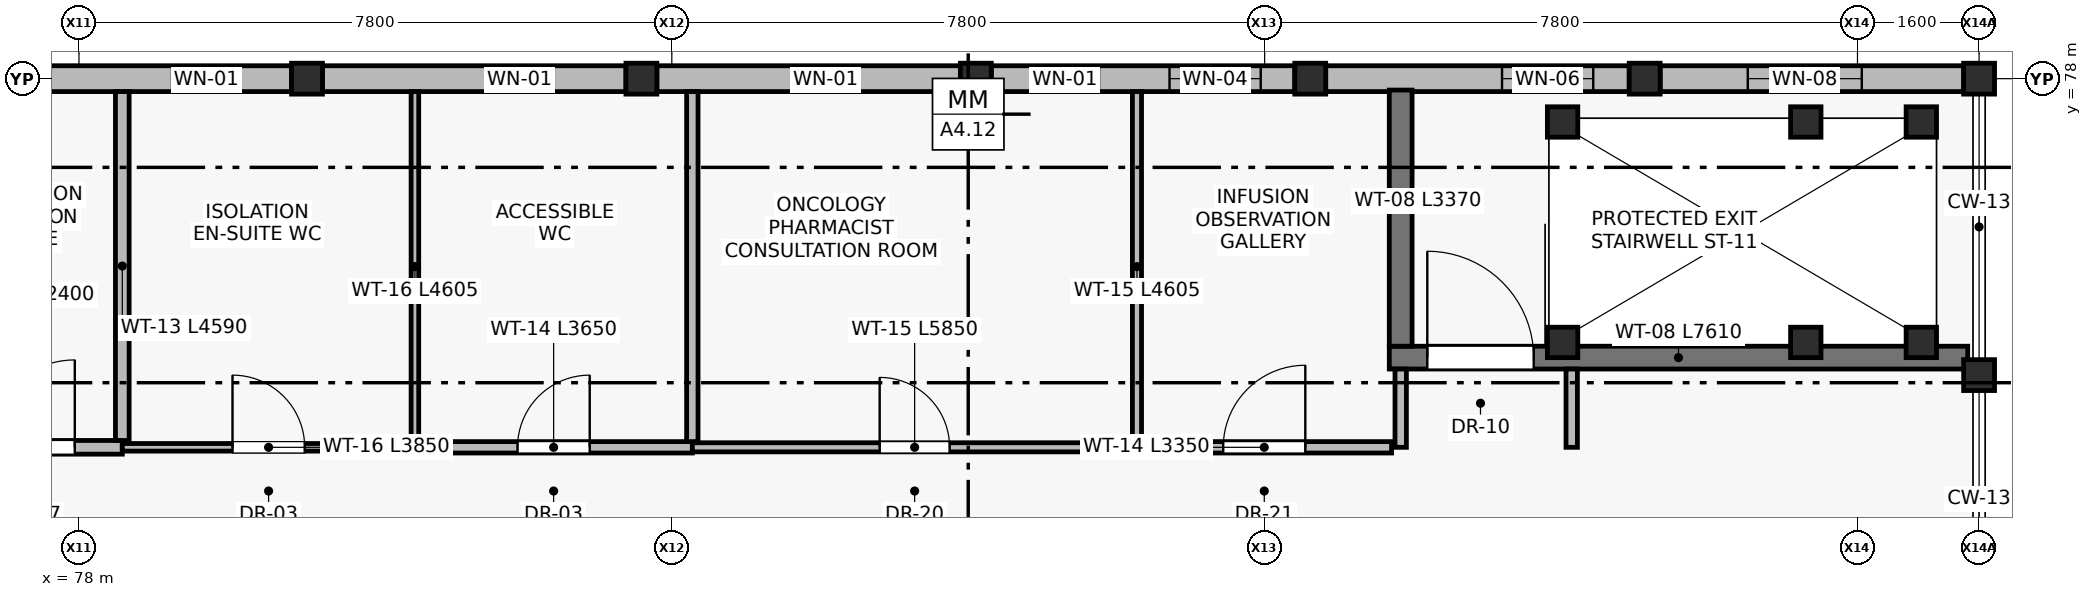
"""IFC4 building model, lengths in metres.
Left out: names, types, materials, properties, quantities, classifications, styles, units other than length and angle.
Written with IfcOpenShell. Run it as: python <this file> out.ifc"""

import sys

from ifc_helpers import new_model, si_unit, direction, frame, frame_2d, origin, origin_2d, place, context, subcontext, project, spatial, rectangle, hollow_circle, extrude, element, fill, save


model = new_model("IFC4")
c1 = context("Model", 3, precision=1e-05, world=origin(), true_north=direction((0.0, 1.0)))
c2 = subcontext(c1, "Body", "Model", "MODEL_VIEW")
j1 = project(units=[si_unit("LENGTHUNIT", "METRE"), si_unit("PLANEANGLEUNIT", "RADIAN")], contexts=[c1])
p1 = place(None, origin())
s1 = spatial("IfcSite", under=j1, at=p1, CompositionType="ELEMENT")
p2 = place(p1, origin())
s2 = spatial("IfcBuilding", under=s1, at=p2, CompositionType="ELEMENT")
p3 = place(p2, frame((0.0, 0.0, 4.8)))
s3 = spatial("IfcBuildingStorey", under=s2, at=p3, CompositionType="ELEMENT", Elevation=4.8)
for number, where, z_axis, x_axis in (
    (1, (81.0, 78.0, 0.0), (0.0, 0.0, 1.0), (1.0, 0.0, 0.0)),
    (2, (85.4, 78.0, 0.0), (0.0, 0.0, 1.0), (1.0, 0.0, 0.0)),
    (3, (89.8, 78.0, 0.0), (0.0, 0.0, 1.0), (1.0, 0.0, 0.0)),
    (4, (94.2, 78.0, 0.0), (0.0, 0.0, 1.0), (1.0, 0.0, 0.0)),
    (5, (98.6, 78.0, 0.0), (0.0, 0.0, 1.0), (1.0, 0.0, 0.0)),
    (6, (103.0, 78.0, 0.0), (0.0, 0.0, 1.0), (1.0, 0.0, 0.0)),
    (7, (103.0, 74.1, 0.0), (0.0, 0.0, 1.0), (1.0, 0.0, 0.0)),
):
    element("IfcColumn", number, at=place(p3, frame(where, z_axis=z_axis, x_axis=x_axis)), inside=s3, PredefinedType="COLUMN", context=c2, shape_type="SweptSolid", body=[
        extrude(hollow_circle(Radius=0.203, WallThickness=0.016, at=origin_2d()), origin(), (0.0, 0.0, 1.0), 4.8),
    ])
for number, where, z_axis, x_axis in (
    (8, (97.52, 74.53, 0.0), (0.0, 0.0, 1.0), (1.0, 0.0, 0.0)),
    (9, (97.52, 77.43, 0.0), (0.0, 0.0, 1.0), (1.0, 0.0, 0.0)),
    (10, (100.72, 74.53, 0.0), (0.0, 0.0, 1.0), (1.0, 0.0, 0.0)),
    (11, (100.72, 77.43, 0.0), (0.0, 0.0, 1.0), (1.0, 0.0, 0.0)),
    (12, (102.24, 74.53, 0.0), (0.0, 0.0, 1.0), (1.0, 0.0, 0.0)),
    (13, (102.24, 77.43, 0.0), (0.0, 0.0, 1.0), (1.0, 0.0, 0.0)),
):
    element("IfcColumn", number, at=place(p3, frame(where, z_axis=z_axis, x_axis=x_axis)), inside=s3, PredefinedType="COLUMN", context=c2, shape_type="SweptSolid", body=[
        extrude(rectangle(XDim=0.4, YDim=0.4, at=origin_2d()), origin(), (0.0, 0.0, 1.0), 4.8),
    ])
p4 = place(p3, frame((76.803, 78.0, 0.0), z_axis=(0.0, 0.0, 1.0), x_axis=(1.0, 0.0, 0.0)))
e14 = element("IfcWall", 14, at=p4, inside=s3, PredefinedType="STANDARD", context=c2, shape_type="SweptSolid", body=[
    extrude(rectangle(XDim=3.994, YDim=0.34, at=frame_2d((1.997, 0.0))), origin(), (0.0, 0.0, 1.0), 4.75),
])
p5 = place(p4, frame((2.42, 0.0, 0.9)))
e15 = element("IfcOpeningElement", 15, at=p5, cuts=e14, PredefinedType="OPENING", context=c2, shape_type="SweptSolid", body=[
    extrude(rectangle(XDim=0.9, YDim=1.6, at=frame_2d((0.45, 0.8))), frame((0.0, 0.18, 0.0), z_axis=(0.0, -1.0, 0.0), x_axis=(1.0, 0.0, 0.0)), (0.0, 0.0, 1.0), 0.36),
])
p6 = place(p3, frame((81.203, 78.0, 0.0), z_axis=(0.0, 0.0, 1.0), x_axis=(1.0, 0.0, 0.0)))
e16 = element("IfcWall", 16, at=p6, inside=s3, PredefinedType="STANDARD", context=c2, shape_type="SweptSolid", body=[
    extrude(rectangle(XDim=3.994, YDim=0.34, at=frame_2d((1.997, 0.0))), origin(), (0.0, 0.0, 1.0), 4.75),
])
p7 = place(p6, frame((2.145, 0.0, 0.9)))
e17 = element("IfcOpeningElement", 17, at=p7, cuts=e16, PredefinedType="OPENING", context=c2, shape_type="SweptSolid", body=[
    extrude(rectangle(XDim=0.9, YDim=1.6, at=frame_2d((0.45, 0.8))), frame((0.0, 0.18, 0.0), z_axis=(0.0, -1.0, 0.0), x_axis=(1.0, 0.0, 0.0)), (0.0, 0.0, 1.0), 0.36),
])
p8 = place(p3, frame((85.603, 78.0, 0.0), z_axis=(0.0, 0.0, 1.0), x_axis=(1.0, 0.0, 0.0)))
e18 = element("IfcWall", 18, at=p8, inside=s3, PredefinedType="STANDARD", context=c2, shape_type="SweptSolid", body=[
    extrude(rectangle(XDim=3.993, YDim=0.34, at=frame_2d((1.997, 0.0))), origin(), (0.0, 0.0, 1.0), 4.75),
])
p9 = place(p8, frame((1.77, 0.0, 0.9)))
e19 = element("IfcOpeningElement", 19, at=p9, cuts=e18, PredefinedType="OPENING", context=c2, shape_type="SweptSolid", body=[
    extrude(rectangle(XDim=0.9, YDim=1.6, at=frame_2d((0.45, 0.8))), frame((0.0, 0.18, 0.0), z_axis=(0.0, -1.0, 0.0), x_axis=(1.0, 0.0, 0.0)), (0.0, 0.0, 1.0), 0.36),
])
p10 = place(p3, frame((90.003, 78.0, 0.0), z_axis=(0.0, 0.0, 1.0), x_axis=(1.0, 0.0, 0.0)))
e20 = element("IfcWall", 20, at=p10, inside=s3, PredefinedType="STANDARD", context=c2, shape_type="SweptSolid", body=[
    extrude(rectangle(XDim=3.994, YDim=0.34, at=frame_2d((1.997, 0.0))), origin(), (0.0, 0.0, 1.0), 4.75),
])
p11 = place(p10, frame((0.518, 0.0, 0.9)))
e21 = element("IfcOpeningElement", 21, at=p11, cuts=e20, PredefinedType="OPENING", context=c2, shape_type="SweptSolid", body=[
    extrude(rectangle(XDim=0.9, YDim=1.6, at=frame_2d((0.45, 0.8))), frame((0.0, 0.18, 0.0), z_axis=(0.0, -1.0, 0.0), x_axis=(1.0, 0.0, 0.0)), (0.0, 0.0, 1.0), 0.36),
])
p12 = place(p10, frame((2.345, 0.0, 0.9)))
e22 = element("IfcOpeningElement", 22, at=p12, cuts=e20, PredefinedType="OPENING", context=c2, shape_type="SweptSolid", body=[
    extrude(rectangle(XDim=1.2, YDim=1.5, at=frame_2d((0.6, 0.75))), frame((0.0, 0.18, 0.0), z_axis=(0.0, -1.0, 0.0), x_axis=(1.0, 0.0, 0.0)), (0.0, 0.0, 1.0), 0.36),
])
p13 = place(p3, frame((94.403, 78.0, 0.0), z_axis=(0.0, 0.0, 1.0), x_axis=(1.0, 0.0, 0.0)))
e23 = element("IfcWall", 23, at=p13, inside=s3, PredefinedType="STANDARD", context=c2, shape_type="SweptSolid", body=[
    extrude(rectangle(XDim=3.993, YDim=0.34, at=frame_2d((1.997, 0.0))), origin(), (0.0, 0.0, 1.0), 4.75),
])
p14 = place(p13, frame((2.32, 0.0, 0.9)))
e24 = element("IfcOpeningElement", 24, at=p14, cuts=e23, PredefinedType="OPENING", context=c2, shape_type="SweptSolid", body=[
    extrude(rectangle(XDim=1.2, YDim=2.1, at=frame_2d((0.6, 1.05))), frame((0.0, 0.18, 0.0), z_axis=(0.0, -1.0, 0.0), x_axis=(1.0, 0.0, 0.0)), (0.0, 0.0, 1.0), 0.36),
])
p15 = place(p3, frame((98.803, 78.0, 0.0), z_axis=(0.0, 0.0, 1.0), x_axis=(1.0, 0.0, 0.0)))
e25 = element("IfcWall", 25, at=p15, inside=s3, PredefinedType="STANDARD", context=c2, shape_type="SweptSolid", body=[
    extrude(rectangle(XDim=3.994, YDim=0.34, at=frame_2d((1.997, 0.0))), origin(), (0.0, 0.0, 1.0), 4.75),
])
p16 = place(p15, frame((1.153, 0.0, 0.9)))
e26 = element("IfcOpeningElement", 26, at=p16, cuts=e25, PredefinedType="OPENING", context=c2, shape_type="SweptSolid", body=[
    extrude(rectangle(XDim=1.5, YDim=1.5, at=frame_2d((0.75, 0.75))), frame((0.0, 0.18, 0.0), z_axis=(0.0, -1.0, 0.0), x_axis=(1.0, 0.0, 0.0)), (0.0, 0.0, 1.0), 0.36),
])
p17 = place(p3, frame((95.24, 74.33, 0.0), z_axis=(0.0, 0.0, 1.0), x_axis=(1.0, 0.0, 0.0)))
e27 = element("IfcWall", 27, at=p17, inside=s3, PredefinedType="SHEAR", context=c2, shape_type="SweptSolid", body=[
    extrude(rectangle(XDim=7.61, YDim=0.3, at=frame_2d((3.805, 0.0))), origin(), (0.0, 0.0, 1.0), 4.54),
])
p18 = place(p17, frame((0.5, 0.0, 0.0)))
e28 = element("IfcOpeningElement", 28, at=p18, cuts=e27, PredefinedType="OPENING", context=c2, shape_type="SweptSolid", body=[
    extrude(rectangle(XDim=1.4, YDim=2.2, at=frame_2d((0.7, 1.1))), frame((0.0, 0.16, 0.0), z_axis=(0.0, -1.0, 0.0), x_axis=(1.0, 0.0, 0.0)), (0.0, 0.0, 1.0), 0.32),
])
p19 = place(p3, frame((95.39, 77.85, 0.0), z_axis=(0.0, 0.0, 1.0), x_axis=(0.0, -1.0, 0.0)))
e29 = element("IfcWall", 29, at=p19, inside=s3, PredefinedType="SHEAR", context=c2, shape_type="SweptSolid", body=[
    extrude(rectangle(XDim=3.37, YDim=0.3, at=frame_2d((1.685, 0.0))), origin(), (0.0, 0.0, 1.0), 4.54),
])
for number, where, z_axis, x_axis in (
    (30, (95.39, 73.15, 0.0), (0.0, 0.0, 1.0), (0.0, 1.0, 0.0)),
    (31, (97.64, 73.15, 0.0), (0.0, 0.0, 1.0), (0.0, 1.0, 0.0)),
):
    element("IfcWall", number, at=place(p3, frame(where, z_axis=z_axis, x_axis=x_axis)), inside=s3, PredefinedType="PARTITIONING", context=c2, shape_type="SweptSolid", body=[
        extrude(rectangle(XDim=1.03, YDim=0.15, at=frame_2d((0.515, 0.0))), origin(), (0.0, 0.0, 1.0), 4.54),
    ])
p20 = place(p3, frame((76.17, 73.15, 0.0), z_axis=(0.0, 0.0, 1.0), x_axis=(1.0, 0.0, 0.0)))
e32 = element("IfcWall", 32, at=p20, inside=s3, PredefinedType="PARTITIONING", context=c2, shape_type="SweptSolid", body=[
    extrude(rectangle(XDim=2.4, YDim=0.18, at=frame_2d((1.2, 0.0))), origin(), (0.0, 0.0, 1.0), 4.54),
])
p21 = place(p20, frame((0.625, 0.0, 0.0)))
e33 = element("IfcOpeningElement", 33, at=p21, cuts=e32, PredefinedType="OPENING", context=c2, shape_type="SweptSolid", body=[
    extrude(rectangle(XDim=1.15, YDim=2.2, at=frame_2d((0.575, 1.1))), frame((0.0, 0.1, 0.0), z_axis=(0.0, -1.0, 0.0), x_axis=(1.0, 0.0, 0.0)), (0.0, 0.0, 1.0), 0.2),
])
p22 = place(p3, frame((78.57, 73.15, 0.0), z_axis=(0.0, 0.0, 1.0), x_axis=(1.0, 0.0, 0.0)))
e34 = element("IfcWall", 34, at=p22, inside=s3, PredefinedType="PARTITIONING", context=c2, shape_type="SweptSolid", body=[
    extrude(rectangle(XDim=3.85, YDim=0.1, at=frame_2d((1.925, 0.0))), origin(), (0.0, 0.0, 1.0), 4.54),
])
p23 = place(p22, frame((1.45, 0.0, 0.0)))
e35 = element("IfcOpeningElement", 35, at=p23, cuts=e34, PredefinedType="OPENING", context=c2, shape_type="SweptSolid", body=[
    extrude(rectangle(XDim=0.95, YDim=2.1, at=frame_2d((0.475, 1.05))), frame((0.0, 0.06, 0.0), z_axis=(0.0, -1.0, 0.0), x_axis=(1.0, 0.0, 0.0)), (0.0, 0.0, 1.0), 0.12),
])
p24 = place(p3, frame((82.42, 73.15, 0.0), z_axis=(0.0, 0.0, 1.0), x_axis=(1.0, 0.0, 0.0)))
e36 = element("IfcWall", 36, at=p24, inside=s3, PredefinedType="PARTITIONING", context=c2, shape_type="SweptSolid", body=[
    extrude(rectangle(XDim=3.65, YDim=0.15, at=frame_2d((1.825, 0.0))), origin(), (0.0, 0.0, 1.0), 4.54),
])
p25 = place(p24, frame((1.35, 0.0, 0.0)))
e37 = element("IfcOpeningElement", 37, at=p25, cuts=e36, PredefinedType="OPENING", context=c2, shape_type="SweptSolid", body=[
    extrude(rectangle(XDim=0.95, YDim=2.1, at=frame_2d((0.475, 1.05))), frame((0.0, 0.085, 0.0), z_axis=(0.0, -1.0, 0.0), x_axis=(1.0, 0.0, 0.0)), (0.0, 0.0, 1.0), 0.17),
])
p26 = place(p3, frame((86.07, 73.15, 0.0), z_axis=(0.0, 0.0, 1.0), x_axis=(1.0, 0.0, 0.0)))
e38 = element("IfcWall", 38, at=p26, inside=s3, PredefinedType="PARTITIONING", context=c2, shape_type="SweptSolid", body=[
    extrude(rectangle(XDim=5.85, YDim=0.12, at=frame_2d((2.925, 0.0))), origin(), (0.0, 0.0, 1.0), 4.54),
])
p27 = place(p26, frame((2.465, 0.0, 0.0)))
e39 = element("IfcOpeningElement", 39, at=p27, cuts=e38, PredefinedType="OPENING", context=c2, shape_type="SweptSolid", body=[
    extrude(rectangle(XDim=0.92, YDim=2.15, at=frame_2d((0.46, 1.075))), frame((0.0, 0.07, 0.0), z_axis=(0.0, -1.0, 0.0), x_axis=(1.0, 0.0, 0.0)), (0.0, 0.0, 1.0), 0.14),
])
p28 = place(p3, frame((91.92, 73.15, 0.0), z_axis=(0.0, 0.0, 1.0), x_axis=(1.0, 0.0, 0.0)))
e40 = element("IfcWall", 40, at=p28, inside=s3, PredefinedType="PARTITIONING", context=c2, shape_type="SweptSolid", body=[
    extrude(rectangle(XDim=3.35, YDim=0.15, at=frame_2d((1.675, 0.0))), origin(), (0.0, 0.0, 1.0), 4.54),
])
p29 = place(p28, frame((1.135, 0.0, 0.0)))
e41 = element("IfcOpeningElement", 41, at=p29, cuts=e40, PredefinedType="OPENING", context=c2, shape_type="SweptSolid", body=[
    extrude(rectangle(XDim=1.08, YDim=2.2, at=frame_2d((0.54, 1.1))), frame((0.0, 0.085, 0.0), z_axis=(0.0, -1.0, 0.0), x_axis=(1.0, 0.0, 0.0)), (0.0, 0.0, 1.0), 0.17),
])
p30 = place(p3, frame((78.57, 73.24, 0.0), z_axis=(0.0, 0.0, 1.0), x_axis=(0.0, 1.0, 0.0)))
e42 = element("IfcWall", 42, at=p30, inside=s3, PredefinedType="PARTITIONING", context=c2, shape_type="SweptSolid", body=[
    extrude(rectangle(XDim=4.59, YDim=0.18, at=frame_2d((2.295, 0.0))), origin(), (0.0, 0.0, 1.0), 4.54),
])
p31 = place(p3, frame((82.42, 73.225, 0.0), z_axis=(0.0, 0.0, 1.0), x_axis=(0.0, 1.0, 0.0)))
e43 = element("IfcWall", 43, at=p31, inside=s3, PredefinedType="PARTITIONING", context=c2, shape_type="SweptSolid", body=[
    extrude(rectangle(XDim=4.605, YDim=0.1, at=frame_2d((2.302, 0.0))), origin(), (0.0, 0.0, 1.0), 4.54),
])
p32 = place(p3, frame((86.07, 73.225, 0.0), z_axis=(0.0, 0.0, 1.0), x_axis=(0.0, 1.0, 0.0)))
e44 = element("IfcWall", 44, at=p32, inside=s3, PredefinedType="PARTITIONING", context=c2, shape_type="SweptSolid", body=[
    extrude(rectangle(XDim=4.605, YDim=0.15, at=frame_2d((2.302, 0.0))), origin(), (0.0, 0.0, 1.0), 4.54),
])
p33 = place(p3, frame((91.92, 73.225, 0.0), z_axis=(0.0, 0.0, 1.0), x_axis=(0.0, 1.0, 0.0)))
e45 = element("IfcWall", 45, at=p33, inside=s3, PredefinedType="PARTITIONING", context=c2, shape_type="SweptSolid", body=[
    extrude(rectangle(XDim=4.605, YDim=0.12, at=frame_2d((2.302, 0.0))), origin(), (0.0, 0.0, 1.0), 4.54),
])
p34 = place(p5, origin())
e46 = element("IfcWindow", 46, at=p34, inside=s3, PartitioningType="SINGLE_PANEL", PredefinedType="WINDOW", context=c2, shape_type="SweptSolid", body=[
    extrude(rectangle(XDim=0.9, YDim=1.6, at=frame_2d((0.45, 0.8))), frame((0.0, 0.03, 0.0), z_axis=(0.0, -1.0, 0.0), x_axis=(1.0, 0.0, 0.0)), (0.0, 0.0, 1.0), 0.06),
])
fill(e15, e46)
p35 = place(p7, origin())
e47 = element("IfcWindow", 47, at=p35, inside=s3, PartitioningType="SINGLE_PANEL", PredefinedType="WINDOW", context=c2, shape_type="SweptSolid", body=[
    extrude(rectangle(XDim=0.9, YDim=1.6, at=frame_2d((0.45, 0.8))), frame((0.0, 0.03, 0.0), z_axis=(0.0, -1.0, 0.0), x_axis=(1.0, 0.0, 0.0)), (0.0, 0.0, 1.0), 0.06),
])
fill(e17, e47)
p36 = place(p9, origin())
e48 = element("IfcWindow", 48, at=p36, inside=s3, PartitioningType="SINGLE_PANEL", PredefinedType="WINDOW", context=c2, shape_type="SweptSolid", body=[
    extrude(rectangle(XDim=0.9, YDim=1.6, at=frame_2d((0.45, 0.8))), frame((0.0, 0.03, 0.0), z_axis=(0.0, -1.0, 0.0), x_axis=(1.0, 0.0, 0.0)), (0.0, 0.0, 1.0), 0.06),
])
fill(e19, e48)
p37 = place(p11, origin())
e49 = element("IfcWindow", 49, at=p37, inside=s3, PartitioningType="SINGLE_PANEL", PredefinedType="WINDOW", context=c2, shape_type="SweptSolid", body=[
    extrude(rectangle(XDim=0.9, YDim=1.6, at=frame_2d((0.45, 0.8))), frame((0.0, 0.03, 0.0), z_axis=(0.0, -1.0, 0.0), x_axis=(1.0, 0.0, 0.0)), (0.0, 0.0, 1.0), 0.06),
])
fill(e21, e49)
p38 = place(p12, origin())
e50 = element("IfcWindow", 50, at=p38, inside=s3, PartitioningType="SINGLE_PANEL", PredefinedType="WINDOW", context=c2, shape_type="SweptSolid", body=[
    extrude(rectangle(XDim=1.2, YDim=1.5, at=frame_2d((0.6, 0.75))), frame((0.0, 0.03, 0.0), z_axis=(0.0, -1.0, 0.0), x_axis=(1.0, 0.0, 0.0)), (0.0, 0.0, 1.0), 0.06),
])
fill(e22, e50)
p39 = place(p14, origin())
e51 = element("IfcWindow", 51, at=p39, inside=s3, PartitioningType="SINGLE_PANEL", PredefinedType="WINDOW", context=c2, shape_type="SweptSolid", body=[
    extrude(rectangle(XDim=1.2, YDim=2.1, at=frame_2d((0.6, 1.05))), frame((0.0, 0.03, 0.0), z_axis=(0.0, -1.0, 0.0), x_axis=(1.0, 0.0, 0.0)), (0.0, 0.0, 1.0), 0.06),
])
fill(e24, e51)
p40 = place(p16, origin())
e52 = element("IfcWindow", 52, at=p40, inside=s3, PartitioningType="SINGLE_PANEL", PredefinedType="WINDOW", context=c2, shape_type="SweptSolid", body=[
    extrude(rectangle(XDim=1.5, YDim=1.5, at=frame_2d((0.75, 0.75))), frame((0.0, 0.03, 0.0), z_axis=(0.0, -1.0, 0.0), x_axis=(1.0, 0.0, 0.0)), (0.0, 0.0, 1.0), 0.06),
])
fill(e26, e52)
p41 = place(p18, origin())
e53 = element("IfcDoor", 53, at=p41, inside=s3, OperationType="SINGLE_SWING_LEFT", PredefinedType="DOOR", context=c2, shape_type="SweptSolid", body=[
    extrude(rectangle(XDim=1.4, YDim=2.2, at=frame_2d((0.7, 1.1))), frame((0.0, 0.025, 0.0), z_axis=(0.0, -1.0, 0.0), x_axis=(1.0, 0.0, 0.0)), (0.0, 0.0, 1.0), 0.05),
])
fill(e28, e53)
p42 = place(p21, origin())
e54 = element("IfcDoor", 54, at=p42, inside=s3, OperationType="SINGLE_SWING_RIGHT", PredefinedType="DOOR", context=c2, shape_type="SweptSolid", body=[
    extrude(rectangle(XDim=1.15, YDim=2.2, at=frame_2d((0.575, 1.1))), frame((0.0, 0.025, 0.0), z_axis=(0.0, -1.0, 0.0), x_axis=(1.0, 0.0, 0.0)), (0.0, 0.0, 1.0), 0.05),
])
fill(e33, e54)
p43 = place(p23, origin())
e55 = element("IfcDoor", 55, at=p43, inside=s3, OperationType="SINGLE_SWING_LEFT", PredefinedType="DOOR", context=c2, shape_type="SweptSolid", body=[
    extrude(rectangle(XDim=0.95, YDim=2.1, at=frame_2d((0.475, 1.05))), frame((0.0, 0.025, 0.0), z_axis=(0.0, -1.0, 0.0), x_axis=(1.0, 0.0, 0.0)), (0.0, 0.0, 1.0), 0.05),
])
fill(e35, e55)
p44 = place(p25, origin())
e56 = element("IfcDoor", 56, at=p44, inside=s3, OperationType="SINGLE_SWING_RIGHT", PredefinedType="DOOR", context=c2, shape_type="SweptSolid", body=[
    extrude(rectangle(XDim=0.95, YDim=2.1, at=frame_2d((0.475, 1.05))), frame((0.0, 0.025, 0.0), z_axis=(0.0, -1.0, 0.0), x_axis=(1.0, 0.0, 0.0)), (0.0, 0.0, 1.0), 0.05),
])
fill(e37, e56)
p45 = place(p27, origin())
e57 = element("IfcDoor", 57, at=p45, inside=s3, OperationType="SINGLE_SWING_LEFT", PredefinedType="DOOR", context=c2, shape_type="SweptSolid", body=[
    extrude(rectangle(XDim=0.92, YDim=2.15, at=frame_2d((0.46, 1.075))), frame((0.0, 0.025, 0.0), z_axis=(0.0, -1.0, 0.0), x_axis=(1.0, 0.0, 0.0)), (0.0, 0.0, 1.0), 0.05),
])
fill(e39, e57)
p46 = place(p29, origin())
e58 = element("IfcDoor", 58, at=p46, inside=s3, OperationType="SINGLE_SWING_RIGHT", PredefinedType="DOOR", context=c2, shape_type="SweptSolid", body=[
    extrude(rectangle(XDim=1.08, YDim=2.2, at=frame_2d((0.54, 1.1))), frame((0.0, 0.025, 0.0), z_axis=(0.0, -1.0, 0.0), x_axis=(1.0, 0.0, 0.0)), (0.0, 0.0, 1.0), 0.05),
])
fill(e41, e58)
save(model, sys.argv[1])
